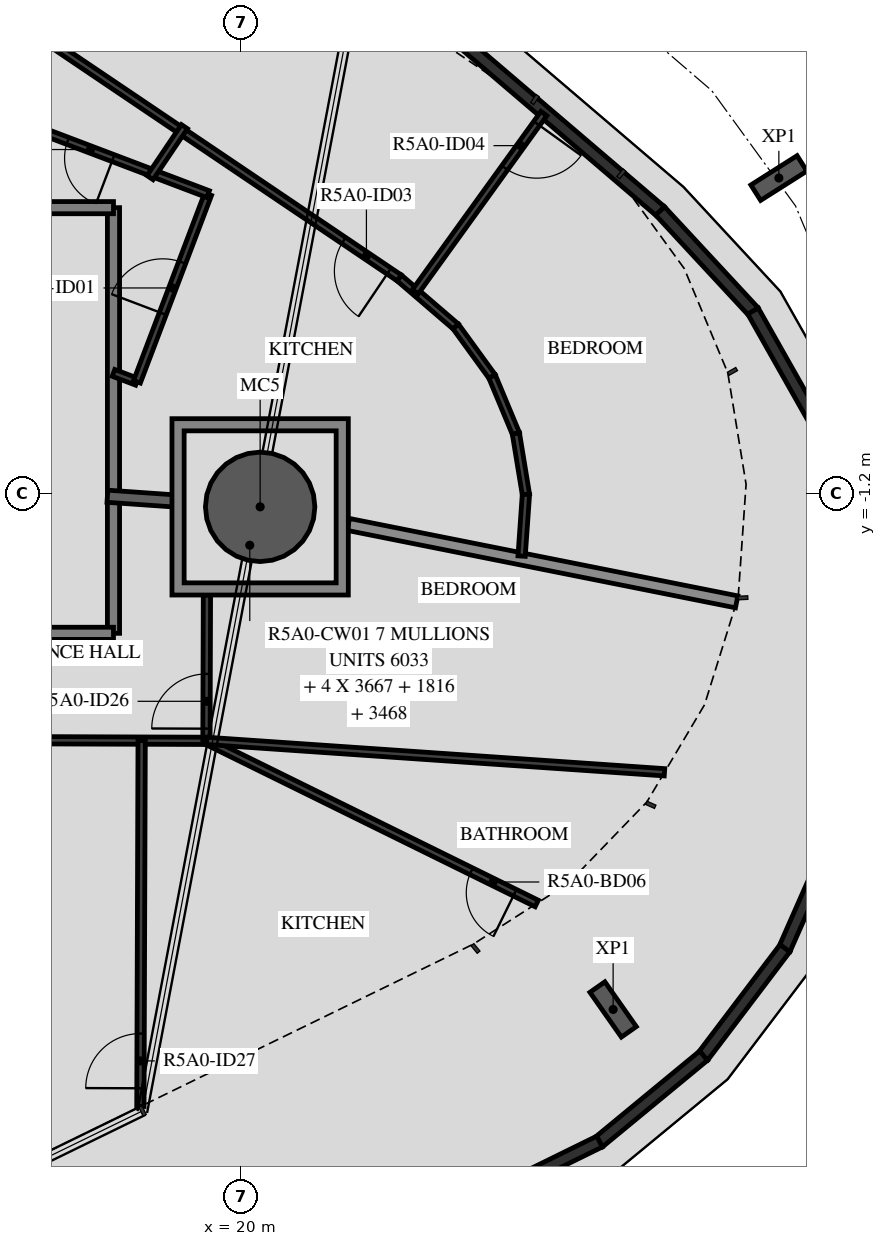
"""IFC4 building model, lengths in metres.
Left out: names, types, materials, properties, quantities, classifications, styles, units other than length and angle.
Written with IfcOpenShell. Run it as: python <this file> out.ifc"""

import sys

from ifc_helpers import new_model, si_unit, direction, frame, frame_2d, origin, origin_2d, place, context, subcontext, project, spatial, polyline, rectangle, hollow_circle, i_section, outline, extrude, element, fill, save


model = new_model("IFC4")
c1 = context("Model", 3, precision=1e-05, world=origin(), true_north=direction((0.0, 1.0)))
c2 = subcontext(c1, "Body", "Model", "MODEL_VIEW")
j1 = project(units=[si_unit("LENGTHUNIT", "METRE"), si_unit("PLANEANGLEUNIT", "RADIAN")], contexts=[c1])
p1 = place(None, origin())
s1 = spatial("IfcSite", under=j1, at=p1, CompositionType="ELEMENT")
p2 = place(p1, origin())
s2 = spatial("IfcBuilding", under=s1, at=p2, CompositionType="ELEMENT")
p3 = place(p2, frame((0.0, 0.0, 188.4)))
s3 = spatial("IfcBuildingStorey", under=s2, at=p3, CompositionType="ELEMENT", Elevation=188.4)
p4 = place(p3, frame((20.312, -1.42, -0.45), z_axis=(0.0, 0.0, 1.0), x_axis=(1.0, 0.0, 0.0)))
e1 = element("IfcColumn", 1, at=p4, inside=s3, PredefinedType="COLUMN", context=c2, shape_type="SweptSolid", body=[
    extrude(hollow_circle(Radius=0.9, WallThickness=0.04, at=origin_2d()), origin(), (0.0, 0.0, 1.0), 3.57),
])
for number, where, z_axis, x_axis in (
    (2, (26.117, -9.686, -0.45), (0.0, 0.0, 1.0), (-0.818, -0.575, 0.0)),
    (3, (28.842, 3.987, -0.45), (0.0, 0.0, 1.0), (0.535, -0.845, 0.0)),
):
    element("IfcColumn", number, at=place(p3, frame(where, z_axis=z_axis, x_axis=x_axis)), inside=s3, PredefinedType="COLUMN", context=c2, shape_type="SweptSolid", body=[
        extrude(i_section(OverallWidth=0.3, OverallDepth=0.9, WebThickness=0.019, FlangeThickness=0.035, FilletRadius=0.03, at=origin_2d()), origin(), (0.0, 0.0, 1.0), 3.57),
    ])
p5 = place(p3, frame((-0.808, 27.101, 0.03), z_axis=(0.0, 0.0, 1.0), x_axis=(0.76040780846, -0.649445890613, 0.0)))
e4 = element("IfcWall", 4, at=p5, inside=s3, PredefinedType="PARAPET", context=c2, shape_type="SweptSolid", body=[
    extrude(rectangle(XDim=36.429, YDim=0.2, at=frame_2d((18.214, 0.0))), origin(), (0.0, 0.0, 1.0), 1.5),
])
p6 = place(p3, frame((26.889, 3.446, 0.03), z_axis=(0.0, 0.0, 1.0), x_axis=(0.67989093074, -0.733313249777, 0.0)))
e5 = element("IfcWall", 5, at=p6, inside=s3, PredefinedType="PARAPET", context=c2, shape_type="SweptSolid", body=[
    extrude(rectangle(XDim=2.258, YDim=0.2, at=frame_2d((1.129, 0.0))), origin(), (0.0, 0.0, 1.0), 1.5),
])
for number, where, z_axis, x_axis in (
    (6, (28.417, 1.8, 0.03), (0.0, 0.0, 1.0), (0.492, -0.87, 0.0)),
    (7, (29.836, -6.651, 0.03), (0.0, 0.0, 1.0), (-0.404, -0.915, 0.0)),
):
    element("IfcWall", number, at=place(p3, frame(where, z_axis=z_axis, x_axis=x_axis)), inside=s3, PredefinedType="PARAPET", context=c2, shape_type="SweptSolid", body=[
        extrude(rectangle(XDim=2.228, YDim=0.2, at=frame_2d((1.114, 0.0))), origin(), (0.0, 0.0, 1.0), 1.5),
    ])
p7 = place(p3, frame((28.942, -8.679, 0.03), z_axis=(0.0, 0.0, 1.0), x_axis=(-0.604077067239, -0.796925904232, 0.0)))
e8 = element("IfcWall", 8, at=p7, inside=s3, PredefinedType="PARAPET", context=c2, shape_type="SweptSolid", body=[
    extrude(rectangle(XDim=2.228, YDim=0.2, at=frame_2d((1.114, 0.0))), origin(), (0.0, 0.0, 1.0), 1.5),
])
p8 = place(p3, frame((27.604, -10.447, 0.03), z_axis=(0.0, 0.0, 1.0), x_axis=(-0.771613891472, -0.636091190386, 0.0)))
e9 = element("IfcWall", 9, at=p8, inside=s3, PredefinedType="PARAPET", context=c2, shape_type="SweptSolid", body=[
    extrude(rectangle(XDim=2.229, YDim=0.2, at=frame_2d((1.114, 0.0))), origin(), (0.0, 0.0, 1.0), 1.5),
])
p9 = place(p3, frame((25.894, -11.858, 0.03), z_axis=(0.0, 0.0, 1.0), x_axis=(-0.897498758366, -0.441016982361, 0.0)))
e10 = element("IfcWall", 10, at=p9, inside=s3, PredefinedType="PARAPET", context=c2, shape_type="SweptSolid", body=[
    extrude(rectangle(XDim=2.258, YDim=0.2, at=frame_2d((1.129, 0.0))), origin(), (0.0, 0.0, 1.0), 1.5),
])
p10 = place(p3, frame((17.9, -3.5, 0.0), z_axis=(0.0, 0.0, 1.0), x_axis=(0.0, 1.0, 0.0)))
e11 = element("IfcWall", 11, at=p10, inside=s3, PredefinedType="STANDARD", context=c2, shape_type="SweptSolid", body=[
    extrude(rectangle(XDim=7.0, YDim=0.2, at=frame_2d((3.5, 0.0))), origin(), (0.0, 0.0, 1.0), 3.12),
])
p11 = place(p3, frame((17.9, 3.5, 0.0), z_axis=(0.0, 0.0, 1.0), x_axis=(-1.0, 0.0, 0.0)))
e12 = element("IfcWall", 12, at=p11, inside=s3, PredefinedType="STANDARD", context=c2, shape_type="SweptSolid", body=[
    extrude(rectangle(XDim=4.698, YDim=0.2, at=frame_2d((2.349, 0.0))), origin(), (0.0, 0.0, 1.0), 3.12),
])
p12 = place(p3, frame((13.188, -3.5, 0.0), z_axis=(0.0, 0.0, 1.0), x_axis=(1.0, 0.0, 0.0)))
e13 = element("IfcWall", 13, at=p12, inside=s3, PredefinedType="STANDARD", context=c2, shape_type="SweptSolid", body=[
    extrude(rectangle(XDim=4.712, YDim=0.2, at=frame_2d((2.356, 0.0))), origin(), (0.0, 0.0, 1.0), 3.12),
])
p13 = place(p3, frame((21.762, -1.709, 0.0), z_axis=(0.0, 0.0, 1.0), x_axis=(0.980707365343, -0.195481619501, 0.0)))
e14 = element("IfcWall", 14, at=p13, inside=s3, PredefinedType="STANDARD", context=c2, shape_type="SweptSolid", body=[
    extrude(rectangle(XDim=6.512, YDim=0.2, at=frame_2d((3.256, 0.0))), origin(), (0.0, 0.0, 1.0), 2.73),
])
p14 = place(p3, frame((17.8, -1.246, 0.0), z_axis=(0.0, 0.0, 1.0), x_axis=(0.997562681713, -0.069776042122, 0.0)))
e15 = element("IfcWall", 15, at=p14, inside=s3, PredefinedType="STANDARD", context=c2, shape_type="SweptSolid", body=[
    extrude(rectangle(XDim=1.144, YDim=0.2, at=frame_2d((0.572, 0.0))), origin(), (0.0, 0.0, 1.0), 3.12),
])
p15 = place(p3, frame((17.9, 0.783, 0.0), z_axis=(0.0, 0.0, 1.0), x_axis=(0.93513272442, -0.354297597677, 0.0)))
e16 = element("IfcWall", 16, at=p15, inside=s3, PredefinedType="PARTITIONING", context=c2, shape_type="SweptSolid", body=[
    extrude(rectangle(XDim=0.413, YDim=0.12, at=frame_2d((0.207, 0.0))), origin(), (0.0, 0.0, 1.0), 3.12),
])
p16 = place(p3, frame((18.286, 0.637, 0.0), z_axis=(0.0, 0.0, 1.0), x_axis=(0.354672075988, 0.934990758518, 0.0)))
e17 = element("IfcWall", 17, at=p16, inside=s3, PredefinedType="PARTITIONING", context=c2, shape_type="SweptSolid", body=[
    extrude(rectangle(XDim=3.3, YDim=0.12, at=frame_2d((1.65, 0.0))), origin(), (0.0, 0.0, 1.0), 3.12),
])
p17 = place(p16, frame((1.2, 0.0, 0.0)))
e18 = element("IfcOpeningElement", 18, at=p17, cuts=e17, PredefinedType="OPENING", context=c2, shape_type="SweptSolid", body=[
    extrude(rectangle(XDim=0.9, YDim=2.1, at=frame_2d((0.45, 1.05))), frame((0.0, 0.07, 0.0), z_axis=(0.0, -1.0, 0.0), x_axis=(1.0, 0.0, 0.0)), (0.0, 0.0, 1.0), 0.14),
])
p18 = place(p3, frame((19.456, 3.722, 0.0), z_axis=(0.0, 0.0, 1.0), x_axis=(-0.935017484321, 0.3546016131, 0.0)))
e19 = element("IfcWall", 19, at=p18, inside=s3, PredefinedType="PARTITIONING", context=c2, shape_type="SweptSolid", body=[
    extrude(rectangle(XDim=5.734, YDim=0.12, at=frame_2d((2.867, 0.0))), origin(), (0.0, 0.0, 1.0), 3.12),
])
p19 = place(p18, frame((1.669, 0.0, 0.0)))
e20 = element("IfcOpeningElement", 20, at=p19, cuts=e19, PredefinedType="OPENING", context=c2, shape_type="SweptSolid", body=[
    extrude(rectangle(XDim=0.8, YDim=2.1, at=frame_2d((0.4, 1.05))), frame((0.0, 0.07, 0.0), z_axis=(0.0, -1.0, 0.0), x_axis=(1.0, 0.0, 0.0)), (0.0, 0.0, 1.0), 0.14),
])
p20 = place(p3, frame((22.598, 2.345, 0.0), z_axis=(0.0, 0.0, 1.0), x_axis=(0.758596166141, -0.651561092083, 0.0)))
e21 = element("IfcWall", 21, at=p20, inside=s3, PredefinedType="PARTITIONING", context=c2, shape_type="SweptSolid", body=[
    extrude(rectangle(XDim=1.227, YDim=0.12, at=frame_2d((0.614, 0.0))), origin(), (0.0, 0.0, 1.0), 3.12),
])
p21 = place(p3, frame((23.529, 1.545, 0.0), z_axis=(0.0, 0.0, 1.0), x_axis=(0.587742994292, -0.809047694923, 0.0)))
e22 = element("IfcWall", 22, at=p21, inside=s3, PredefinedType="PARTITIONING", context=c2, shape_type="SweptSolid", body=[
    extrude(rectangle(XDim=1.016, YDim=0.12, at=frame_2d((0.508, 0.0))), origin(), (0.0, 0.0, 1.0), 3.12),
])
for number, where, z_axis, x_axis in (
    (23, (24.126, 0.723, 0.0), (0.0, 0.0, 1.0), (0.385, -0.923, 0.0)),
    (24, (24.518, -0.214, 0.0), (0.0, 0.0, 1.0), (0.162, -0.987, 0.0)),
    (25, (24.683, -1.217, 0.0), (0.0, 0.0, 1.0), (-0.07, -0.998, 0.0)),
):
    element("IfcWall", number, at=place(p3, frame(where, z_axis=z_axis, x_axis=x_axis)), inside=s3, PredefinedType="PARTITIONING", context=c2, shape_type="SweptSolid", body=[
        extrude(rectangle(XDim=1.016, YDim=0.12, at=frame_2d((0.508, 0.0))), origin(), (0.0, 0.0, 1.0), 3.12),
    ])
p22 = place(p3, frame((24.978, 5.047, 0.0), z_axis=(0.0, 0.0, 1.0), x_axis=(-0.585041443684, -0.811003396523, 0.0)))
e26 = element("IfcWall", 26, at=p22, inside=s3, PredefinedType="PARTITIONING", context=c2, shape_type="SweptSolid", body=[
    extrude(rectangle(XDim=3.613, YDim=0.12, at=frame_2d((1.807, 0.0))), origin(), (0.0, 0.0, 1.0), 3.12),
])
p23 = place(p22, frame((0.2, 0.0, 0.0)))
e27 = element("IfcOpeningElement", 27, at=p23, cuts=e26, PredefinedType="OPENING", context=c2, shape_type="SweptSolid", body=[
    extrude(rectangle(XDim=0.9, YDim=2.1, at=frame_2d((0.45, 1.05))), frame((0.0, 0.07, 0.0), z_axis=(0.0, -1.0, 0.0), x_axis=(1.0, 0.0, 0.0)), (0.0, 0.0, 1.0), 0.14),
])
p24 = place(p3, frame((22.598, 2.345, 0.0), z_axis=(0.0, 0.0, 1.0), x_axis=(-0.829034113947, 0.559198031034, 0.0)))
e28 = element("IfcWall", 28, at=p24, inside=s3, PredefinedType="PARTITIONING", context=c2, shape_type="SweptSolid", body=[
    extrude(rectangle(XDim=12.879, YDim=0.12, at=frame_2d((6.439, 0.0))), origin(), (0.0, 0.0, 1.0), 3.12),
])
p25 = place(p24, frame((0.2, 0.0, 0.0)))
e29 = element("IfcOpeningElement", 29, at=p25, cuts=e28, PredefinedType="OPENING", context=c2, shape_type="SweptSolid", body=[
    extrude(rectangle(XDim=0.9, YDim=2.1, at=frame_2d((0.45, 1.05))), frame((0.0, 0.07, 0.0), z_axis=(0.0, -1.0, 0.0), x_axis=(1.0, 0.0, 0.0)), (0.0, 0.0, 1.0), 0.14),
])
p26 = place(p3, frame((19.067, 4.832, 0.0), z_axis=(0.0, 0.0, 1.0), x_axis=(-0.559257363459, -0.828994090098, 0.0)))
e30 = element("IfcWall", 30, at=p26, inside=s3, PredefinedType="PARTITIONING", context=c2, shape_type="SweptSolid", body=[
    extrude(rectangle(XDim=1.012, YDim=0.12, at=frame_2d((0.506, 0.0))), origin(), (0.0, 0.0, 1.0), 3.12),
])
p27 = place(p3, frame((14.431, -5.251, 0.0), z_axis=(0.0, 0.0, 1.0), x_axis=(0.999994153659, -0.003419451456, 0.0)))
e31 = element("IfcWall", 31, at=p27, inside=s3, PredefinedType="PARTITIONING", context=c2, shape_type="SweptSolid", body=[
    extrude(rectangle(XDim=4.998, YDim=0.12, at=frame_2d((2.499, 0.0))), origin(), (0.0, 0.0, 1.0), 3.12),
])
p28 = place(p3, frame((19.429, -5.268, 0.0), z_axis=(0.0, 0.0, 1.0), x_axis=(0.003360127656, 0.999994354755, 0.0)))
e32 = element("IfcWall", 32, at=p28, inside=s3, PredefinedType="PARTITIONING", context=c2, shape_type="SweptSolid", body=[
    extrude(rectangle(XDim=2.398, YDim=0.12, at=frame_2d((1.199, 0.0))), origin(), (0.0, 0.0, 1.0), 3.12),
])
p29 = place(p28, frame((0.2, 0.0, 0.0)))
e33 = element("IfcOpeningElement", 33, at=p29, cuts=e32, PredefinedType="OPENING", context=c2, shape_type="SweptSolid", body=[
    extrude(rectangle(XDim=0.9, YDim=2.1, at=frame_2d((0.45, 1.05))), frame((0.0, 0.07, 0.0), z_axis=(0.0, -1.0, 0.0), x_axis=(1.0, 0.0, 0.0)), (0.0, 0.0, 1.0), 0.14),
])
p30 = place(p3, frame((18.343, -11.282, 0.0), z_axis=(0.0, 0.0, 1.0), x_axis=(0.003448675073, 0.999994053302, 0.0)))
e34 = element("IfcWall", 34, at=p30, inside=s3, PredefinedType="PARTITIONING", context=c2, shape_type="SweptSolid", body=[
    extrude(rectangle(XDim=6.017, YDim=0.12, at=frame_2d((3.009, 0.0))), origin(), (0.0, 0.0, 1.0), 3.12),
])
p31 = place(p30, frame((0.3, 0.0, 0.0)))
e35 = element("IfcOpeningElement", 35, at=p31, cuts=e34, PredefinedType="OPENING", context=c2, shape_type="SweptSolid", body=[
    extrude(rectangle(XDim=0.9, YDim=2.1, at=frame_2d((0.45, 1.05))), frame((0.0, 0.07, 0.0), z_axis=(0.0, -1.0, 0.0), x_axis=(1.0, 0.0, 0.0)), (0.0, 0.0, 1.0), 0.14),
])
p32 = place(p3, frame((24.861, -7.943, 0.0), z_axis=(0.0, 0.0, 1.0), x_axis=(-0.897128390861, 0.441769906525, 0.0)))
e36 = element("IfcWall", 36, at=p32, inside=s3, PredefinedType="PARTITIONING", context=c2, shape_type="SweptSolid", body=[
    extrude(rectangle(XDim=6.055, YDim=0.12, at=frame_2d((3.027, 0.0))), origin(), (0.0, 0.0, 1.0), 3.12),
])
p33 = place(p32, frame((0.4, 0.0, 0.0)))
e37 = element("IfcOpeningElement", 37, at=p33, cuts=e36, PredefinedType="OPENING", context=c2, shape_type="SweptSolid", body=[
    extrude(rectangle(XDim=0.8, YDim=2.1, at=frame_2d((0.4, 1.05))), frame((0.0, 0.07, 0.0), z_axis=(0.0, -1.0, 0.0), x_axis=(1.0, 0.0, 0.0)), (0.0, 0.0, 1.0), 0.14),
])
p34 = place(p3, frame((26.961, -5.785, 0.0), z_axis=(0.0, 0.0, 1.0), x_axis=(-0.997652165985, 0.068484711466, 0.0)))
e38 = element("IfcWall", 38, at=p34, inside=s3, PredefinedType="PARTITIONING", context=c2, shape_type="SweptSolid", body=[
    extrude(rectangle(XDim=7.551, YDim=0.12, at=frame_2d((3.775, 0.0))), origin(), (0.0, 0.0, 1.0), 3.12),
])
p35 = place(p3, origin())
e39 = element("IfcWall", 39, at=p35, inside=s3, PredefinedType="STANDARD", context=c2, shape_type="SweptSolid", body=[
    extrude(outline(polyline([(21.762, 0.03), (21.762, -2.87), (18.862, -2.87), (18.862, 0.03), (21.762, 0.03)]), holes=[polyline([(19.062, -2.67), (21.562, -2.67), (21.562, -0.17), (19.062, -0.17), (19.062, -2.67)])]), origin(), (0.0, 0.0, 1.0), 3.12),
])
p36 = place(p17, origin())
e40 = element("IfcDoor", 40, at=p36, inside=s3, OperationType="SINGLE_SWING_LEFT", PredefinedType="DOOR", context=c2, shape_type="SweptSolid", body=[
    extrude(rectangle(XDim=0.9, YDim=2.1, at=frame_2d((0.45, 1.05))), frame((0.0, 0.025, 0.0), z_axis=(0.0, -1.0, 0.0), x_axis=(1.0, 0.0, 0.0)), (0.0, 0.0, 1.0), 0.05),
])
fill(e18, e40)
p37 = place(p19, origin())
e41 = element("IfcDoor", 41, at=p37, inside=s3, OperationType="SINGLE_SWING_LEFT", PredefinedType="DOOR", context=c2, shape_type="SweptSolid", body=[
    extrude(rectangle(XDim=0.8, YDim=2.1, at=frame_2d((0.4, 1.05))), frame((0.0, 0.025, 0.0), z_axis=(0.0, -1.0, 0.0), x_axis=(1.0, 0.0, 0.0)), (0.0, 0.0, 1.0), 0.05),
])
fill(e20, e41)
p38 = place(p25, origin())
e42 = element("IfcDoor", 42, at=p38, inside=s3, OperationType="SINGLE_SWING_LEFT", PredefinedType="DOOR", context=c2, shape_type="SweptSolid", body=[
    extrude(rectangle(XDim=0.9, YDim=2.1, at=frame_2d((0.45, 1.05))), frame((0.0, 0.025, 0.0), z_axis=(0.0, -1.0, 0.0), x_axis=(1.0, 0.0, 0.0)), (0.0, 0.0, 1.0), 0.05),
])
fill(e29, e42)
p39 = place(p23, origin())
e43 = element("IfcDoor", 43, at=p39, inside=s3, OperationType="SINGLE_SWING_LEFT", PredefinedType="DOOR", context=c2, shape_type="SweptSolid", body=[
    extrude(rectangle(XDim=0.9, YDim=2.1, at=frame_2d((0.45, 1.05))), frame((0.0, 0.025, 0.0), z_axis=(0.0, -1.0, 0.0), x_axis=(1.0, 0.0, 0.0)), (0.0, 0.0, 1.0), 0.05),
])
fill(e27, e43)
p40 = place(p29, origin())
e44 = element("IfcDoor", 44, at=p40, inside=s3, OperationType="SINGLE_SWING_RIGHT", PredefinedType="DOOR", context=c2, shape_type="SweptSolid", body=[
    extrude(rectangle(XDim=0.9, YDim=2.1, at=frame_2d((0.45, 1.05))), frame((0.0, 0.025, 0.0), z_axis=(0.0, -1.0, 0.0), x_axis=(1.0, 0.0, 0.0)), (0.0, 0.0, 1.0), 0.05),
])
fill(e33, e44)
p41 = place(p31, origin())
e45 = element("IfcDoor", 45, at=p41, inside=s3, OperationType="SINGLE_SWING_RIGHT", PredefinedType="DOOR", context=c2, shape_type="SweptSolid", body=[
    extrude(rectangle(XDim=0.9, YDim=2.1, at=frame_2d((0.45, 1.05))), frame((0.0, 0.025, 0.0), z_axis=(0.0, -1.0, 0.0), x_axis=(1.0, 0.0, 0.0)), (0.0, 0.0, 1.0), 0.05),
])
fill(e35, e45)
p42 = place(p33, origin())
e46 = element("IfcDoor", 46, at=p42, inside=s3, OperationType="SINGLE_SWING_RIGHT", PredefinedType="DOOR", context=c2, shape_type="SweptSolid", body=[
    extrude(rectangle(XDim=0.8, YDim=2.1, at=frame_2d((0.4, 1.05))), frame((0.0, 0.025, 0.0), z_axis=(0.0, -1.0, 0.0), x_axis=(1.0, 0.0, 0.0)), (0.0, 0.0, 1.0), 0.05),
])
fill(e37, e46)
save(model, sys.argv[1])
